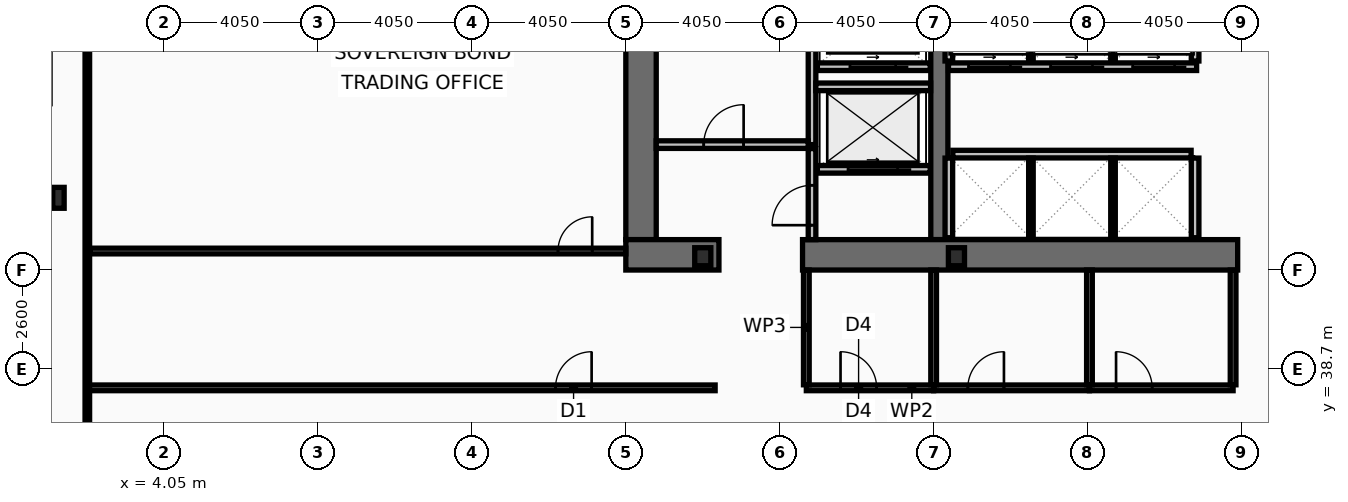
"""IFC4 building model, lengths in metres.
Left out: names, types, materials, properties, quantities, classifications, styles, units other than length and angle.
Written with IfcOpenShell. Run it as: python <this file> out.ifc"""

import sys

from ifc_helpers import new_model, si_unit, direction, frame, frame_2d, origin, origin_2d, place, context, subcontext, project, spatial, rectangle, i_section, extrude, element, fill, save


model = new_model("IFC4")
c1 = context("Model", 3, precision=1e-05, world=origin(), true_north=direction((0.0, 1.0)))
c2 = subcontext(c1, "Body", "Model", "MODEL_VIEW")
j1 = project(units=[si_unit("LENGTHUNIT", "METRE"), si_unit("PLANEANGLEUNIT", "RADIAN")], contexts=[c1])
p1 = place(None, origin())
s1 = spatial("IfcSite", under=j1, at=p1, CompositionType="ELEMENT")
p2 = place(p1, origin())
s2 = spatial("IfcBuilding", under=s1, at=p2, CompositionType="ELEMENT")
p3 = place(p2, frame((0.0, 0.0, 33.8)))
s3 = spatial("IfcBuildingStorey", under=s2, at=p3, CompositionType="ELEMENT", Elevation=33.8)
p4 = place(p3, frame((16.6, 42.1, 0.0), z_axis=(0.0, 0.0, 1.0), x_axis=(0.0, 1.0, 0.0)))
e1 = element("IfcWall", 1, at=p4, inside=s3, PredefinedType="SHEAR", context=c2, shape_type="SweptSolid", body=[
    extrude(rectangle(XDim=10.8, YDim=0.8, at=frame_2d((5.4, 0.0))), origin(), (0.0, 0.0, 1.0), 3.82),
])
p5 = place(p3, frame((24.45, 42.1, 0.0), z_axis=(0.0, 0.0, 1.0), x_axis=(0.0, 1.0, 0.0)))
e2 = element("IfcWall", 2, at=p5, inside=s3, PredefinedType="SHEAR", context=c2, shape_type="SweptSolid", body=[
    extrude(rectangle(XDim=10.8, YDim=0.45, at=frame_2d((5.4, 0.0))), origin(), (0.0, 0.0, 1.0), 3.82),
])
p6 = place(p3, frame((18.65, 41.7, 0.0), z_axis=(0.0, 0.0, 1.0), x_axis=(-1.0, 0.0, 0.0)))
e3 = element("IfcWall", 3, at=p6, inside=s3, PredefinedType="SHEAR", context=c2, shape_type="SweptSolid", body=[
    extrude(rectangle(XDim=2.45, YDim=0.8, at=frame_2d((1.225, 0.0))), origin(), (0.0, 0.0, 1.0), 3.82),
])
p7 = place(p3, frame((32.3, 41.7, 0.0), z_axis=(0.0, 0.0, 1.0), x_axis=(-1.0, 0.0, 0.0)))
e4 = element("IfcWall", 4, at=p7, inside=s3, PredefinedType="SHEAR", context=c2, shape_type="SweptSolid", body=[
    extrude(rectangle(XDim=11.45, YDim=0.8, at=frame_2d((5.725, 0.0))), origin(), (0.0, 0.0, 1.0), 3.82),
])
p8 = place(p3, frame((1.27, 43.2, 0.0), z_axis=(0.0, 0.0, 1.0), x_axis=(1.0, 0.0, 0.0)))
e5 = element("IfcColumn", 5, at=p8, inside=s3, PredefinedType="COLUMN", context=c2, shape_type="SweptSolid", body=[
    extrude(i_section(OverallWidth=0.3, OverallDepth=0.55, WebThickness=0.015, FlangeThickness=0.029, at=origin_2d()), origin(), (0.0, 0.0, 1.0), 4.0),
])
for number, where, z_axis, x_axis in (
    (6, (18.225, 41.65, 0.0), (0.0, 0.0, 1.0), (1.0, 0.0, 0.0)),
    (7, (24.9, 41.65, 0.0), (0.0, 0.0, 1.0), (1.0, 0.0, 0.0)),
):
    element("IfcColumn", number, at=place(p3, frame(where, z_axis=z_axis, x_axis=x_axis)), inside=s3, PredefinedType="COLUMN", context=c2, shape_type="SweptSolid", body=[
        extrude(i_section(OverallWidth=0.424, OverallDepth=0.474, WebThickness=0.048, FlangeThickness=0.077, at=origin_2d()), origin(), (0.0, 0.0, 1.0), 4.0),
    ])
p9 = place(p3, frame((24.21, 43.95, 0.0), z_axis=(0.0, 0.0, 1.0), x_axis=(-1.0, 0.0, 0.0)))
e8 = element("IfcWall", 8, at=p9, inside=s3, PredefinedType="PARTITIONING", context=c2, shape_type="SweptSolid", body=[
    extrude(rectangle(XDim=2.97, YDim=0.2, at=frame_2d((1.485, 0.0))), origin(), (0.0, 0.0, 1.0), 3.82),
])
p10 = place(p9, frame((0.86, 0.0, 0.0)))
e9 = element("IfcOpeningElement", 9, at=p10, cuts=e8, PredefinedType="OPENING", context=c2, shape_type="SweptSolid", body=[
    extrude(rectangle(XDim=1.3, YDim=2.18, at=frame_2d((0.65, 1.09))), frame((0.0, 0.11, 0.0), z_axis=(0.0, -1.0, 0.0), x_axis=(1.0, 0.0, 0.0)), (0.0, 0.0, 1.0), 0.22),
])
p11 = place(p3, frame((24.21, 46.65, 0.0), z_axis=(0.0, 0.0, 1.0), x_axis=(-1.0, 0.0, 0.0)))
e10 = element("IfcWall", 10, at=p11, inside=s3, PredefinedType="PARTITIONING", context=c2, shape_type="SweptSolid", body=[
    extrude(rectangle(XDim=2.97, YDim=0.2, at=frame_2d((1.485, 0.0))), origin(), (0.0, 0.0, 1.0), 3.82),
])
p12 = place(p11, frame((0.91, 0.0, 0.0)))
e11 = element("IfcOpeningElement", 11, at=p12, cuts=e10, PredefinedType="OPENING", context=c2, shape_type="SweptSolid", body=[
    extrude(rectangle(XDim=1.2, YDim=2.18, at=frame_2d((0.6, 1.09))), frame((0.0, 0.11, 0.0), z_axis=(0.0, -1.0, 0.0), x_axis=(1.0, 0.0, 0.0)), (0.0, 0.0, 1.0), 0.22),
])
p13 = place(p3, frame((31.22, 46.65, 0.0), z_axis=(0.0, 0.0, 1.0), x_axis=(-1.0, 0.0, 0.0)))
e12 = element("IfcWall", 12, at=p13, inside=s3, PredefinedType="PARTITIONING", context=c2, shape_type="SweptSolid", body=[
    extrude(rectangle(XDim=6.53, YDim=0.2, at=frame_2d((3.265, 0.0))), origin(), (0.0, 0.0, 1.0), 3.82),
])
p14 = place(p13, frame((4.9, 0.0, 0.0)))
e13 = element("IfcOpeningElement", 13, at=p14, cuts=e12, PredefinedType="OPENING", context=c2, shape_type="SweptSolid", body=[
    extrude(rectangle(XDim=1.1, YDim=2.18, at=frame_2d((0.55, 1.09))), frame((0.0, 0.11, 0.0), z_axis=(0.0, -1.0, 0.0), x_axis=(1.0, 0.0, 0.0)), (0.0, 0.0, 1.0), 0.22),
])
p15 = place(p13, frame((2.74, 0.0, 0.0)))
e14 = element("IfcOpeningElement", 14, at=p15, cuts=e12, PredefinedType="OPENING", context=c2, shape_type="SweptSolid", body=[
    extrude(rectangle(XDim=1.1, YDim=2.18, at=frame_2d((0.55, 1.09))), frame((0.0, 0.11, 0.0), z_axis=(0.0, -1.0, 0.0), x_axis=(1.0, 0.0, 0.0)), (0.0, 0.0, 1.0), 0.22),
])
p16 = place(p13, frame((0.58, 0.0, 0.0)))
e15 = element("IfcOpeningElement", 15, at=p16, cuts=e12, PredefinedType="OPENING", context=c2, shape_type="SweptSolid", body=[
    extrude(rectangle(XDim=1.1, YDim=2.18, at=frame_2d((0.55, 1.09))), frame((0.0, 0.11, 0.0), z_axis=(0.0, -1.0, 0.0), x_axis=(1.0, 0.0, 0.0)), (0.0, 0.0, 1.0), 0.22),
])
p17 = place(p3, frame((21.1, 44.6, 0.0), z_axis=(0.0, 0.0, 1.0), x_axis=(0.0, 1.0, 0.0)))
e16 = element("IfcWall", 16, at=p17, inside=s3, PredefinedType="PARTITIONING", context=c2, shape_type="SweptSolid", body=[
    extrude(rectangle(XDim=4.3, YDim=0.2, at=frame_2d((2.15, 0.0))), origin(), (0.0, 0.0, 1.0), 3.82),
])
p18 = place(p3, frame((17.0, 44.6, 0.0), z_axis=(0.0, 0.0, 1.0), x_axis=(1.0, 0.0, 0.0)))
e17 = element("IfcWall", 17, at=p18, inside=s3, PredefinedType="PARTITIONING", context=c2, shape_type="SweptSolid", body=[
    extrude(rectangle(XDim=4.0, YDim=0.2, at=frame_2d((2.0, 0.0))), origin(), (0.0, 0.0, 1.0), 3.82),
])
p19 = place(p18, frame((1.25, 0.0, 0.0)))
e18 = element("IfcOpeningElement", 18, at=p19, cuts=e17, PredefinedType="OPENING", context=c2, shape_type="SweptSolid", body=[
    extrude(rectangle(XDim=1.05, YDim=2.15, at=frame_2d((0.525, 1.075))), frame((0.0, 0.11, 0.0), z_axis=(0.0, -1.0, 0.0), x_axis=(1.0, 0.0, 0.0)), (0.0, 0.0, 1.0), 0.22),
])
p20 = place(p3, frame((21.2, 46.12, 0.0), z_axis=(0.0, 0.0, 1.0), x_axis=(1.0, 0.0, 0.0)))
e19 = element("IfcWall", 19, at=p20, inside=s3, PredefinedType="PARTITIONING", context=c2, shape_type="SweptSolid", body=[
    extrude(rectangle(XDim=3.02, YDim=0.2, at=frame_2d((1.51, 0.0))), origin(), (0.0, 0.0, 1.0), 3.82),
])
p21 = place(p3, frame((21.1, 42.1, 0.0), z_axis=(0.0, 0.0, 1.0), x_axis=(0.0, 1.0, 0.0)))
e20 = element("IfcWall", 20, at=p21, inside=s3, PredefinedType="PARTITIONING", context=c2, shape_type="SweptSolid", body=[
    extrude(rectangle(XDim=2.395, YDim=0.2, at=frame_2d((1.198, 0.0))), origin(), (0.0, 0.0, 1.0), 3.82),
])
p22 = place(p21, frame((0.38, 0.0, 0.0)))
e21 = element("IfcOpeningElement", 21, at=p22, cuts=e20, PredefinedType="OPENING", context=c2, shape_type="SweptSolid", body=[
    extrude(rectangle(XDim=1.05, YDim=2.15, at=frame_2d((0.525, 1.075))), frame((0.0, 0.11, 0.0), z_axis=(0.0, -1.0, 0.0), x_axis=(1.0, 0.0, 0.0)), (0.0, 0.0, 1.0), 0.22),
])
for number, where, z_axis, x_axis in (
    (22, (24.7, 46.8, 0.0), (0.0, 0.0, 1.0), (0.0, 1.0, 0.0)),
    (23, (31.18, 46.8, 0.0), (0.0, 0.0, 1.0), (0.0, 1.0, 0.0)),
):
    element("IfcWall", number, at=place(p3, frame(where, z_axis=z_axis, x_axis=x_axis)), inside=s3, PredefinedType="PARTITIONING", context=c2, shape_type="SweptSolid", body=[
        extrude(rectangle(XDim=2.095, YDim=0.2, at=frame_2d((1.047, 0.0))), origin(), (0.0, 0.0, 1.0), 3.82),
    ])
for number, where, z_axis, x_axis in (
    (24, (26.86, 46.8, 0.0), (0.0, 0.0, 1.0), (0.0, 1.0, 0.0)),
    (25, (29.02, 46.8, 0.0), (0.0, 0.0, 1.0), (0.0, 1.0, 0.0)),
):
    element("IfcWall", number, at=place(p3, frame(where, z_axis=z_axis, x_axis=x_axis)), inside=s3, PredefinedType="PARTITIONING", context=c2, shape_type="SweptSolid", body=[
        extrude(rectangle(XDim=2.095, YDim=0.12, at=frame_2d((1.047, 0.0))), origin(), (0.0, 0.0, 1.0), 3.82),
    ])
p23 = place(p3, frame((24.805, 44.35, 0.0), z_axis=(0.0, 0.0, 1.0), x_axis=(1.0, 0.0, 0.0)))
e26 = element("IfcWall", 26, at=p23, inside=s3, PredefinedType="PARTITIONING", context=c2, shape_type="SweptSolid", body=[
    extrude(rectangle(XDim=6.27, YDim=0.2, at=frame_2d((3.135, 0.0))), origin(), (0.0, 0.0, 1.0), 3.82),
])
for number, where, z_axis, x_axis in (
    (27, (24.7, 42.15, 0.0), (0.0, 0.0, 1.0), (0.0, 1.0, 0.0)),
    (28, (31.18, 42.15, 0.0), (0.0, 0.0, 1.0), (0.0, 1.0, 0.0)),
):
    element("IfcWall", number, at=place(p3, frame(where, z_axis=z_axis, x_axis=x_axis)), inside=s3, PredefinedType="PARTITIONING", context=c2, shape_type="SweptSolid", body=[
        extrude(rectangle(XDim=2.095, YDim=0.2, at=frame_2d((1.048, 0.0))), origin(), (0.0, 0.0, 1.0), 3.82),
    ])
for number, where, z_axis, x_axis in (
    (29, (26.86, 42.15, 0.0), (0.0, 0.0, 1.0), (0.0, 1.0, 0.0)),
    (30, (29.02, 42.15, 0.0), (0.0, 0.0, 1.0), (0.0, 1.0, 0.0)),
):
    element("IfcWall", number, at=place(p3, frame(where, z_axis=z_axis, x_axis=x_axis)), inside=s3, PredefinedType="PARTITIONING", context=c2, shape_type="SweptSolid", body=[
        extrude(rectangle(XDim=2.095, YDim=0.12, at=frame_2d((1.048, 0.0))), origin(), (0.0, 0.0, 1.0), 3.82),
    ])
p24 = place(p3, frame((20.95, 38.2, 0.0), z_axis=(0.0, 0.0, 1.0), x_axis=(1.0, 0.0, 0.0)))
e31 = element("IfcWall", 31, at=p24, inside=s3, PredefinedType="PARTITIONING", context=c2, shape_type="SweptSolid", body=[
    extrude(rectangle(XDim=3.35, YDim=0.15, at=frame_2d((1.675, 0.0))), origin(), (0.0, 0.0, 1.0), 3.82),
])
p25 = place(p24, frame((0.9, 0.0, 0.0)))
e32 = element("IfcOpeningElement", 32, at=p25, cuts=e31, PredefinedType="OPENING", context=c2, shape_type="SweptSolid", body=[
    extrude(rectangle(XDim=0.95, YDim=2.05, at=frame_2d((0.475, 1.025))), frame((0.0, 0.085, 0.0), z_axis=(0.0, -1.0, 0.0), x_axis=(1.0, 0.0, 0.0)), (0.0, 0.0, 1.0), 0.17),
])
p26 = place(p3, frame((24.3, 38.2, 0.0), z_axis=(0.0, 0.0, 1.0), x_axis=(1.0, 0.0, 0.0)))
e33 = element("IfcWall", 33, at=p26, inside=s3, PredefinedType="PARTITIONING", context=c2, shape_type="SweptSolid", body=[
    extrude(rectangle(XDim=4.1, YDim=0.15, at=frame_2d((2.05, 0.0))), origin(), (0.0, 0.0, 1.0), 3.01),
])
p27 = place(p26, frame((0.9, 0.0, 0.0)))
e34 = element("IfcOpeningElement", 34, at=p27, cuts=e33, PredefinedType="OPENING", context=c2, shape_type="SweptSolid", body=[
    extrude(rectangle(XDim=0.95, YDim=2.05, at=frame_2d((0.475, 1.025))), frame((0.0, 0.085, 0.0), z_axis=(0.0, -1.0, 0.0), x_axis=(1.0, 0.0, 0.0)), (0.0, 0.0, 1.0), 0.17),
])
p28 = place(p3, frame((28.4, 38.2, 0.0), z_axis=(0.0, 0.0, 1.0), x_axis=(1.0, 0.0, 0.0)))
e35 = element("IfcWall", 35, at=p28, inside=s3, PredefinedType="PARTITIONING", context=c2, shape_type="SweptSolid", body=[
    extrude(rectangle(XDim=3.78, YDim=0.15, at=frame_2d((1.89, 0.0))), origin(), (0.0, 0.0, 1.0), 3.01),
])
p29 = place(p28, frame((0.7, 0.0, 0.0)))
e36 = element("IfcOpeningElement", 36, at=p29, cuts=e35, PredefinedType="OPENING", context=c2, shape_type="SweptSolid", body=[
    extrude(rectangle(XDim=0.95, YDim=2.05, at=frame_2d((0.475, 1.025))), frame((0.0, 0.085, 0.0), z_axis=(0.0, -1.0, 0.0), x_axis=(1.0, 0.0, 0.0)), (0.0, 0.0, 1.0), 0.17),
])
for number, where, z_axis, x_axis in (
    (37, (20.95, 38.28, 0.0), (0.0, 0.0, 1.0), (0.0, 1.0, 0.0)),
    (38, (24.3, 38.28, 0.0), (0.0, 0.0, 1.0), (0.0, 1.0, 0.0)),
    (39, (28.4, 38.28, 0.0), (0.0, 0.0, 1.0), (0.0, 1.0, 0.0)),
    (40, (32.18, 38.28, 0.0), (0.0, 0.0, 1.0), (0.0, 1.0, 0.0)),
):
    element("IfcWall", number, at=place(p3, frame(where, z_axis=z_axis, x_axis=x_axis)), inside=s3, PredefinedType="PARTITIONING", context=c2, shape_type="SweptSolid", body=[
        extrude(rectangle(XDim=3.02, YDim=0.15, at=frame_2d((1.51, 0.0))), origin(), (0.0, 0.0, 1.0), 3.82),
    ])
p30 = place(p3, frame((2.03, 38.2, 0.0), z_axis=(0.0, 0.0, 1.0), x_axis=(1.0, 0.0, 0.0)))
e41 = element("IfcWall", 41, at=p30, inside=s3, PredefinedType="PARTITIONING", context=c2, shape_type="SweptSolid", body=[
    extrude(rectangle(XDim=16.52, YDim=0.15, at=frame_2d((8.26, 0.0))), origin(), (0.0, 0.0, 1.0), 3.01),
])
p31 = place(p30, frame((12.32, 0.0, 0.0)))
e42 = element("IfcOpeningElement", 42, at=p31, cuts=e41, PredefinedType="OPENING", context=c2, shape_type="SweptSolid", body=[
    extrude(rectangle(XDim=0.95, YDim=2.05, at=frame_2d((0.475, 1.025))), frame((0.0, 0.085, 0.0), z_axis=(0.0, -1.0, 0.0), x_axis=(1.0, 0.0, 0.0)), (0.0, 0.0, 1.0), 0.17),
])
p32 = place(p3, frame((2.095, 41.8, 0.0), z_axis=(0.0, 0.0, 1.0), x_axis=(1.0, 0.0, 0.0)))
e43 = element("IfcWall", 43, at=p32, inside=s3, PredefinedType="PARTITIONING", context=c2, shape_type="SweptSolid", body=[
    extrude(rectangle(XDim=14.105, YDim=0.15, at=frame_2d((7.052, 0.0))), origin(), (0.0, 0.0, 1.0), 3.82),
])
p33 = place(p32, frame((12.32, 0.0, 0.0)))
e44 = element("IfcOpeningElement", 44, at=p33, cuts=e43, PredefinedType="OPENING", context=c2, shape_type="SweptSolid", body=[
    extrude(rectangle(XDim=0.9, YDim=2.05, at=frame_2d((0.45, 1.025))), frame((0.0, 0.085, 0.0), z_axis=(0.0, -1.0, 0.0), x_axis=(1.0, 0.0, 0.0)), (0.0, 0.0, 1.0), 0.17),
])
p34 = place(p3, frame((2.03, 10.665, 0.0), z_axis=(0.0, 0.0, 1.0), x_axis=(0.0, 1.0, 0.0)))
e45 = element("IfcWall", 45, at=p34, inside=s3, PredefinedType="PARTITIONING", context=c2, shape_type="SweptSolid", body=[
    extrude(rectangle(XDim=42.11, YDim=0.12, at=frame_2d((21.055, 0.0))), origin(), (0.0, 0.0, 1.0), 3.01),
])
p35 = place(p10, origin())
e46 = element("IfcDoor", 46, at=p35, inside=s3, OperationType="SLIDING_TO_LEFT", PredefinedType="DOOR", context=c2, shape_type="SweptSolid", body=[
    extrude(rectangle(XDim=1.3, YDim=2.18, at=frame_2d((0.65, 1.09))), frame((0.0, 0.025, 0.0), z_axis=(0.0, -1.0, 0.0), x_axis=(1.0, 0.0, 0.0)), (0.0, 0.0, 1.0), 0.05),
])
fill(e9, e46)
p36 = place(p12, origin())
e47 = element("IfcDoor", 47, at=p36, inside=s3, OperationType="SLIDING_TO_LEFT", PredefinedType="DOOR", context=c2, shape_type="SweptSolid", body=[
    extrude(rectangle(XDim=1.2, YDim=2.18, at=frame_2d((0.6, 1.09))), frame((0.0, 0.025, 0.0), z_axis=(0.0, -1.0, 0.0), x_axis=(1.0, 0.0, 0.0)), (0.0, 0.0, 1.0), 0.05),
])
fill(e11, e47)
p37 = place(p14, origin())
e48 = element("IfcDoor", 48, at=p37, inside=s3, OperationType="SLIDING_TO_LEFT", PredefinedType="DOOR", context=c2, shape_type="SweptSolid", body=[
    extrude(rectangle(XDim=1.1, YDim=2.18, at=frame_2d((0.55, 1.09))), frame((0.0, 0.025, 0.0), z_axis=(0.0, -1.0, 0.0), x_axis=(1.0, 0.0, 0.0)), (0.0, 0.0, 1.0), 0.05),
])
fill(e13, e48)
p38 = place(p15, origin())
e49 = element("IfcDoor", 49, at=p38, inside=s3, OperationType="SLIDING_TO_LEFT", PredefinedType="DOOR", context=c2, shape_type="SweptSolid", body=[
    extrude(rectangle(XDim=1.1, YDim=2.18, at=frame_2d((0.55, 1.09))), frame((0.0, 0.025, 0.0), z_axis=(0.0, -1.0, 0.0), x_axis=(1.0, 0.0, 0.0)), (0.0, 0.0, 1.0), 0.05),
])
fill(e14, e49)
p39 = place(p16, origin())
e50 = element("IfcDoor", 50, at=p39, inside=s3, OperationType="SLIDING_TO_LEFT", PredefinedType="DOOR", context=c2, shape_type="SweptSolid", body=[
    extrude(rectangle(XDim=1.1, YDim=2.18, at=frame_2d((0.55, 1.09))), frame((0.0, 0.025, 0.0), z_axis=(0.0, -1.0, 0.0), x_axis=(1.0, 0.0, 0.0)), (0.0, 0.0, 1.0), 0.05),
])
fill(e15, e50)
p40 = place(p19, origin())
e51 = element("IfcDoor", 51, at=p40, inside=s3, OperationType="SINGLE_SWING_RIGHT", PredefinedType="DOOR", context=c2, shape_type="SweptSolid", body=[
    extrude(rectangle(XDim=1.05, YDim=2.15, at=frame_2d((0.525, 1.075))), frame((0.0, 0.025, 0.0), z_axis=(0.0, -1.0, 0.0), x_axis=(1.0, 0.0, 0.0)), (0.0, 0.0, 1.0), 0.05),
])
fill(e18, e51)
p41 = place(p22, origin())
e52 = element("IfcDoor", 52, at=p41, inside=s3, OperationType="SINGLE_SWING_LEFT", PredefinedType="DOOR", context=c2, shape_type="SweptSolid", body=[
    extrude(rectangle(XDim=1.05, YDim=2.15, at=frame_2d((0.525, 1.075))), frame((0.0, 0.025, 0.0), z_axis=(0.0, -1.0, 0.0), x_axis=(1.0, 0.0, 0.0)), (0.0, 0.0, 1.0), 0.05),
])
fill(e21, e52)
p42 = place(p25, origin())
e53 = element("IfcDoor", 53, at=p42, inside=s3, OperationType="SINGLE_SWING_LEFT", PredefinedType="DOOR", context=c2, shape_type="SweptSolid", body=[
    extrude(rectangle(XDim=0.95, YDim=2.05, at=frame_2d((0.475, 1.025))), frame((0.0, 0.025, 0.0), z_axis=(0.0, -1.0, 0.0), x_axis=(1.0, 0.0, 0.0)), (0.0, 0.0, 1.0), 0.05),
])
fill(e32, e53)
p43 = place(p27, origin())
e54 = element("IfcDoor", 54, at=p43, inside=s3, OperationType="SINGLE_SWING_RIGHT", PredefinedType="DOOR", context=c2, shape_type="SweptSolid", body=[
    extrude(rectangle(XDim=0.95, YDim=2.05, at=frame_2d((0.475, 1.025))), frame((0.0, 0.025, 0.0), z_axis=(0.0, -1.0, 0.0), x_axis=(1.0, 0.0, 0.0)), (0.0, 0.0, 1.0), 0.05),
])
fill(e34, e54)
p44 = place(p29, origin())
e55 = element("IfcDoor", 55, at=p44, inside=s3, OperationType="SINGLE_SWING_LEFT", PredefinedType="DOOR", context=c2, shape_type="SweptSolid", body=[
    extrude(rectangle(XDim=0.95, YDim=2.05, at=frame_2d((0.475, 1.025))), frame((0.0, 0.025, 0.0), z_axis=(0.0, -1.0, 0.0), x_axis=(1.0, 0.0, 0.0)), (0.0, 0.0, 1.0), 0.05),
])
fill(e36, e55)
p45 = place(p31, origin())
e56 = element("IfcDoor", 56, at=p45, inside=s3, OperationType="SINGLE_SWING_RIGHT", PredefinedType="DOOR", context=c2, shape_type="SweptSolid", body=[
    extrude(rectangle(XDim=0.95, YDim=2.05, at=frame_2d((0.475, 1.025))), frame((0.0, 0.025, 0.0), z_axis=(0.0, -1.0, 0.0), x_axis=(1.0, 0.0, 0.0)), (0.0, 0.0, 1.0), 0.05),
])
fill(e42, e56)
p46 = place(p33, origin())
e57 = element("IfcDoor", 57, at=p46, inside=s3, OperationType="SINGLE_SWING_RIGHT", PredefinedType="DOOR", context=c2, shape_type="SweptSolid", body=[
    extrude(rectangle(XDim=0.9, YDim=2.05, at=frame_2d((0.45, 1.025))), frame((0.0, 0.025, 0.0), z_axis=(0.0, -1.0, 0.0), x_axis=(1.0, 0.0, 0.0)), (0.0, 0.0, 1.0), 0.05),
])
fill(e44, e57)
save(model, sys.argv[1])
